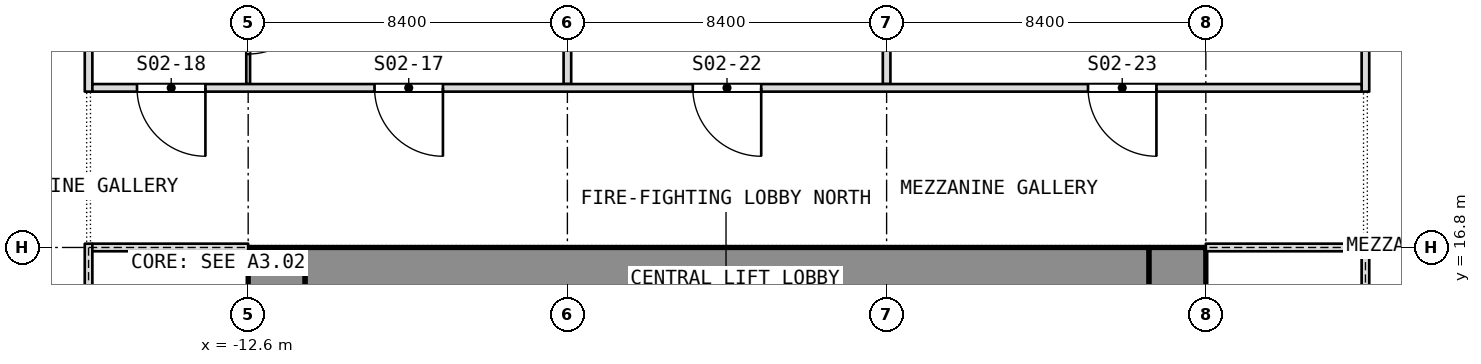
"""IFC4 building model, lengths in metres.
Left out: names, types, materials, properties, quantities, classifications, styles, units other than length and angle.
Written with IfcOpenShell. Run it as: python <this file> out.ifc"""

import sys

from ifc_helpers import new_model, si_unit, direction, frame, frame_2d, origin, place, context, subcontext, project, spatial, rectangle, extrude, element, fill, save


model = new_model("IFC4")
c1 = context("Model", 3, precision=1e-05, world=origin(), true_north=direction((0.0, 1.0)))
c2 = subcontext(c1, "Body", "Model", "MODEL_VIEW")
j1 = project(units=[si_unit("LENGTHUNIT", "METRE"), si_unit("PLANEANGLEUNIT", "RADIAN")], contexts=[c1])
p1 = place(None, origin())
s1 = spatial("IfcSite", under=j1, at=p1, CompositionType="ELEMENT")
p2 = place(p1, origin())
s2 = spatial("IfcBuilding", under=s1, at=p2, CompositionType="ELEMENT")
p3 = place(p2, frame((0.0, 0.0, 8.0)))
s3 = spatial("IfcBuildingStorey", under=s2, at=p3, CompositionType="ELEMENT", Elevation=8.0)
p4 = place(p3, frame((11.85, 0.0, 0.0), z_axis=(0.0, 0.0, 1.0), x_axis=(0.0, 1.0, 0.0)))
e1 = element("IfcWall", 1, at=p4, inside=s3, PredefinedType="SHEAR", context=c2, shape_type="SweptSolid", body=[
    extrude(rectangle(XDim=16.8, YDim=1.5, at=frame_2d((8.4, 0.0))), origin(), (0.0, 0.0, 1.0), 5.0),
])
p5 = place(p4, frame((3.6, 0.0, 0.0)))
e2 = element("IfcOpeningElement", 2, at=p5, cuts=e1, PredefinedType="OPENING", context=c2, shape_type="SweptSolid", body=[
    extrude(rectangle(XDim=0.9, YDim=2.1, at=frame_2d((0.45, 1.05))), frame((0.0, 0.75, 0.0), z_axis=(0.0, -1.0, 0.0), x_axis=(1.0, 0.0, 0.0)), (0.0, 0.0, 1.0), 1.5),
])
p6 = place(p4, frame((6.825, 0.0, 0.0)))
e3 = element("IfcOpeningElement", 3, at=p6, cuts=e1, PredefinedType="OPENING", context=c2, shape_type="SweptSolid", body=[
    extrude(rectangle(XDim=1.2, YDim=2.1, at=frame_2d((0.6, 1.05))), frame((0.0, 0.75, 0.0), z_axis=(0.0, -1.0, 0.0), x_axis=(1.0, 0.0, 0.0)), (0.0, 0.0, 1.0), 1.5),
])
p7 = place(p4, frame((12.3, 0.0, 0.0)))
e4 = element("IfcOpeningElement", 4, at=p7, cuts=e1, PredefinedType="OPENING", context=c2, shape_type="SweptSolid", body=[
    extrude(rectangle(XDim=0.9, YDim=2.1, at=frame_2d((0.45, 1.05))), frame((0.0, 0.75, 0.0), z_axis=(0.0, -1.0, 0.0), x_axis=(1.0, 0.0, 0.0)), (0.0, 0.0, 1.0), 1.5),
])
p8 = place(p4, frame((8.775, 0.0, 0.0)))
e5 = element("IfcOpeningElement", 5, at=p8, cuts=e1, PredefinedType="OPENING", context=c2, shape_type="SweptSolid", body=[
    extrude(rectangle(XDim=1.2, YDim=2.1, at=frame_2d((0.6, 1.05))), frame((0.0, 0.75, 0.0), z_axis=(0.0, -1.0, 0.0), x_axis=(1.0, 0.0, 0.0)), (0.0, 0.0, 1.0), 1.5),
])
p9 = place(p3, frame((-11.85, 0.0, 0.0), z_axis=(0.0, 0.0, 1.0), x_axis=(0.0, 1.0, 0.0)))
e6 = element("IfcWall", 6, at=p9, inside=s3, PredefinedType="SHEAR", context=c2, shape_type="SweptSolid", body=[
    extrude(rectangle(XDim=16.8, YDim=1.5, at=frame_2d((8.4, 0.0))), origin(), (0.0, 0.0, 1.0), 5.0),
])
p10 = place(p9, frame((2.3, 0.0, 0.0)))
e7 = element("IfcOpeningElement", 7, at=p10, cuts=e6, PredefinedType="OPENING", context=c2, shape_type="SweptSolid", body=[
    extrude(rectangle(XDim=1.1, YDim=2.1, at=frame_2d((0.55, 1.05))), frame((0.0, 0.75, 0.0), z_axis=(0.0, -1.0, 0.0), x_axis=(1.0, 0.0, 0.0)), (0.0, 0.0, 1.0), 1.5),
])
p11 = place(p9, frame((4.85, 0.0, 0.0)))
e8 = element("IfcOpeningElement", 8, at=p11, cuts=e6, PredefinedType="OPENING", context=c2, shape_type="SweptSolid", body=[
    extrude(rectangle(XDim=1.1, YDim=2.1, at=frame_2d((0.55, 1.05))), frame((0.0, 0.75, 0.0), z_axis=(0.0, -1.0, 0.0), x_axis=(1.0, 0.0, 0.0)), (0.0, 0.0, 1.0), 1.5),
])
p12 = place(p9, frame((6.825, 0.0, 0.0)))
e9 = element("IfcOpeningElement", 9, at=p12, cuts=e6, PredefinedType="OPENING", context=c2, shape_type="SweptSolid", body=[
    extrude(rectangle(XDim=1.2, YDim=2.1, at=frame_2d((0.6, 1.05))), frame((0.0, 0.75, 0.0), z_axis=(0.0, -1.0, 0.0), x_axis=(1.0, 0.0, 0.0)), (0.0, 0.0, 1.0), 1.5),
])
p13 = place(p9, frame((13.4, 0.0, 0.0)))
e10 = element("IfcOpeningElement", 10, at=p13, cuts=e6, PredefinedType="OPENING", context=c2, shape_type="SweptSolid", body=[
    extrude(rectangle(XDim=1.1, YDim=2.1, at=frame_2d((0.55, 1.05))), frame((0.0, 0.75, 0.0), z_axis=(0.0, -1.0, 0.0), x_axis=(1.0, 0.0, 0.0)), (0.0, 0.0, 1.0), 1.5),
])
p14 = place(p9, frame((10.85, 0.0, 0.0)))
e11 = element("IfcOpeningElement", 11, at=p14, cuts=e6, PredefinedType="OPENING", context=c2, shape_type="SweptSolid", body=[
    extrude(rectangle(XDim=1.1, YDim=2.1, at=frame_2d((0.55, 1.05))), frame((0.0, 0.75, 0.0), z_axis=(0.0, -1.0, 0.0), x_axis=(1.0, 0.0, 0.0)), (0.0, 0.0, 1.0), 1.5),
])
p15 = place(p9, frame((8.775, 0.0, 0.0)))
e12 = element("IfcOpeningElement", 12, at=p15, cuts=e6, PredefinedType="OPENING", context=c2, shape_type="SweptSolid", body=[
    extrude(rectangle(XDim=1.2, YDim=2.1, at=frame_2d((0.6, 1.05))), frame((0.0, 0.75, 0.0), z_axis=(0.0, -1.0, 0.0), x_axis=(1.0, 0.0, 0.0)), (0.0, 0.0, 1.0), 1.5),
])
p16 = place(p3, frame((-11.1, 16.05, 0.0), z_axis=(0.0, 0.0, 1.0), x_axis=(1.0, 0.0, 0.0)))
e13 = element("IfcWall", 13, at=p16, inside=s3, PredefinedType="SHEAR", context=c2, shape_type="SweptSolid", body=[
    extrude(rectangle(XDim=22.2, YDim=1.5, at=frame_2d((11.1, 0.0))), origin(), (0.0, 0.0, 1.0), 5.0),
])
p17 = place(p3, frame((16.8, 20.9, 0.0), z_axis=(0.0, 0.0, 1.0), x_axis=(0.0, 1.0, 0.0)))
e14 = element("IfcWall", 14, at=p17, inside=s3, PredefinedType="PARTITIONING", context=c2, shape_type="SweptSolid", body=[
    extrude(rectangle(XDim=15.0, YDim=0.2, at=frame_2d((7.5, 0.0))), origin(), (0.0, 0.0, 1.0), 4.68),
])
for number, where, z_axis, x_axis in (
    (15, (4.2, 21.1, 0.0), (0.0, 0.0, 1.0), (0.0, 1.0, 0.0)),
    (16, (-4.2, 21.1, 0.0), (0.0, 0.0, 1.0), (0.0, 1.0, 0.0)),
):
    element("IfcWall", number, at=place(p3, frame(where, z_axis=z_axis, x_axis=x_axis)), inside=s3, PredefinedType="PARTITIONING", context=c2, shape_type="SweptSolid", body=[
        extrude(rectangle(XDim=10.73, YDim=0.2, at=frame_2d((5.365, 0.0))), origin(), (0.0, 0.0, 1.0), 4.68),
    ])
p18 = place(p3, frame((-12.6, 21.1, 0.0), z_axis=(0.0, 0.0, 1.0), x_axis=(0.0, 1.0, 0.0)))
e17 = element("IfcWall", 17, at=p18, inside=s3, PredefinedType="PARTITIONING", context=c2, shape_type="SweptSolid", body=[
    extrude(rectangle(XDim=3.38, YDim=0.1, at=frame_2d((1.69, 0.0))), origin(), (0.0, 0.0, 1.0), 4.68),
])
p19 = place(p18, frame((0.79, 0.0, 0.0)))
e18 = element("IfcOpeningElement", 18, at=p19, cuts=e17, PredefinedType="OPENING", context=c2, shape_type="SweptSolid", body=[
    extrude(rectangle(XDim=1.8, YDim=2.1, at=frame_2d((0.9, 1.05))), frame((0.0, 0.05, 0.0), z_axis=(0.0, -1.0, 0.0), x_axis=(1.0, 0.0, 0.0)), (0.0, 0.0, 1.0), 0.1),
])
p20 = place(p3, frame((-16.8, 20.9, 0.0), z_axis=(0.0, 0.0, 1.0), x_axis=(0.0, 1.0, 0.0)))
e19 = element("IfcWall", 19, at=p20, inside=s3, PredefinedType="PARTITIONING", context=c2, shape_type="SweptSolid", body=[
    extrude(rectangle(XDim=13.8, YDim=0.2, at=frame_2d((6.9, 0.0))), origin(), (0.0, 0.0, 1.0), 4.68),
])
p21 = place(p3, frame((-16.7, 21.0, 0.0), z_axis=(0.0, 0.0, 1.0), x_axis=(1.0, 0.0, 0.0)))
e20 = element("IfcWall", 20, at=p21, inside=s3, PredefinedType="PARTITIONING", context=c2, shape_type="SweptSolid", body=[
    extrude(rectangle(XDim=33.4, YDim=0.2, at=frame_2d((16.7, 0.0))), origin(), (0.0, 0.0, 1.0), 4.68),
])
p22 = place(p21, frame((7.425, 0.0, 0.0)))
e21 = element("IfcOpeningElement", 21, at=p22, cuts=e20, PredefinedType="OPENING", context=c2, shape_type="SweptSolid", body=[
    extrude(rectangle(XDim=1.8, YDim=2.1, at=frame_2d((0.9, 1.05))), frame((0.0, 0.1, 0.0), z_axis=(0.0, -1.0, 0.0), x_axis=(1.0, 0.0, 0.0)), (0.0, 0.0, 1.0), 0.2),
])
p23 = place(p21, frame((1.175, 0.0, 0.0)))
e22 = element("IfcOpeningElement", 22, at=p23, cuts=e20, PredefinedType="OPENING", context=c2, shape_type="SweptSolid", body=[
    extrude(rectangle(XDim=1.8, YDim=2.1, at=frame_2d((0.9, 1.05))), frame((0.0, 0.1, 0.0), z_axis=(0.0, -1.0, 0.0), x_axis=(1.0, 0.0, 0.0)), (0.0, 0.0, 1.0), 0.2),
])
p24 = place(p21, frame((15.8, 0.0, 0.0)))
e23 = element("IfcOpeningElement", 23, at=p24, cuts=e20, PredefinedType="OPENING", context=c2, shape_type="SweptSolid", body=[
    extrude(rectangle(XDim=1.8, YDim=2.1, at=frame_2d((0.9, 1.05))), frame((0.0, 0.1, 0.0), z_axis=(0.0, -1.0, 0.0), x_axis=(1.0, 0.0, 0.0)), (0.0, 0.0, 1.0), 0.2),
])
p25 = place(p21, frame((26.2, 0.0, 0.0)))
e24 = element("IfcOpeningElement", 24, at=p25, cuts=e20, PredefinedType="OPENING", context=c2, shape_type="SweptSolid", body=[
    extrude(rectangle(XDim=1.8, YDim=2.1, at=frame_2d((0.9, 1.05))), frame((0.0, 0.1, 0.0), z_axis=(0.0, -1.0, 0.0), x_axis=(1.0, 0.0, 0.0)), (0.0, 0.0, 1.0), 0.2),
])
p26 = place(p3, frame((-16.8, -0.1, 0.0), z_axis=(0.0, 0.0, 1.0), x_axis=(0.0, 1.0, 0.0)))
e25 = element("IfcWall", 25, at=p26, inside=s3, PredefinedType="PARTITIONING", context=c2, shape_type="SweptSolid", body=[
    extrude(rectangle(XDim=17.0, YDim=0.2, at=frame_2d((8.5, 0.0))), origin(), (0.0, 0.0, 1.0), 4.78),
])
p27 = place(p26, frame((1.9, 0.0, 0.0)))
e26 = element("IfcOpeningElement", 26, at=p27, cuts=e25, PredefinedType="OPENING", context=c2, shape_type="SweptSolid", body=[
    extrude(rectangle(XDim=2.4, YDim=2.1, at=frame_2d((1.2, 1.05))), frame((0.0, 0.1, 0.0), z_axis=(0.0, -1.0, 0.0), x_axis=(1.0, 0.0, 0.0)), (0.0, 0.0, 1.0), 0.2),
])
p28 = place(p26, frame((12.7, 0.0, 0.0)))
e27 = element("IfcOpeningElement", 27, at=p28, cuts=e25, PredefinedType="OPENING", context=c2, shape_type="SweptSolid", body=[
    extrude(rectangle(XDim=2.4, YDim=2.1, at=frame_2d((1.2, 1.05))), frame((0.0, 0.1, 0.0), z_axis=(0.0, -1.0, 0.0), x_axis=(1.0, 0.0, 0.0)), (0.0, 0.0, 1.0), 0.2),
])
p29 = place(p3, frame((-16.7, 16.8, 0.0), z_axis=(0.0, 0.0, 1.0), x_axis=(1.0, 0.0, 0.0)))
e28 = element("IfcWall", 28, at=p29, inside=s3, PredefinedType="PARTITIONING", context=c2, shape_type="SweptSolid", body=[
    extrude(rectangle(XDim=4.1, YDim=0.2, at=frame_2d((2.05, 0.0))), origin(), (0.0, 0.0, 1.0), 4.78),
])
p30 = place(p3, frame((16.8, -0.1, 0.0), z_axis=(0.0, 0.0, 1.0), x_axis=(0.0, 1.0, 0.0)))
e29 = element("IfcWall", 29, at=p30, inside=s3, PredefinedType="PARTITIONING", context=c2, shape_type="SweptSolid", body=[
    extrude(rectangle(XDim=17.0, YDim=0.2, at=frame_2d((8.5, 0.0))), origin(), (0.0, 0.0, 1.0), 4.78),
])
p31 = place(p30, frame((1.9, 0.0, 0.0)))
e30 = element("IfcOpeningElement", 30, at=p31, cuts=e29, PredefinedType="OPENING", context=c2, shape_type="SweptSolid", body=[
    extrude(rectangle(XDim=2.4, YDim=2.1, at=frame_2d((1.2, 1.05))), frame((0.0, 0.1, 0.0), z_axis=(0.0, -1.0, 0.0), x_axis=(1.0, 0.0, 0.0)), (0.0, 0.0, 1.0), 0.2),
])
p32 = place(p30, frame((12.7, 0.0, 0.0)))
e31 = element("IfcOpeningElement", 31, at=p32, cuts=e29, PredefinedType="OPENING", context=c2, shape_type="SweptSolid", body=[
    extrude(rectangle(XDim=2.4, YDim=2.1, at=frame_2d((1.2, 1.05))), frame((0.0, 0.1, 0.0), z_axis=(0.0, -1.0, 0.0), x_axis=(1.0, 0.0, 0.0)), (0.0, 0.0, 1.0), 0.2),
])
p33 = place(p3, frame((12.6, 16.8, 0.0), z_axis=(0.0, 0.0, 1.0), x_axis=(1.0, 0.0, 0.0)))
e32 = element("IfcWall", 32, at=p33, inside=s3, PredefinedType="PARTITIONING", context=c2, shape_type="SweptSolid", body=[
    extrude(rectangle(XDim=4.1, YDim=0.2, at=frame_2d((2.05, 0.0))), origin(), (0.0, 0.0, 1.0), 4.78),
])
p34 = place(p19, origin())
e33 = element("IfcDoor", 33, at=p34, inside=s3, OperationType="DOUBLE_DOOR_SINGLE_SWING", PredefinedType="DOOR", context=c2, shape_type="SweptSolid", body=[
    extrude(rectangle(XDim=1.8, YDim=2.1, at=frame_2d((0.9, 1.05))), frame((0.0, 0.025, 0.0), z_axis=(0.0, -1.0, 0.0), x_axis=(1.0, 0.0, 0.0)), (0.0, 0.0, 1.0), 0.05),
])
fill(e18, e33)
p35 = place(p22, origin())
e34 = element("IfcDoor", 34, at=p35, inside=s3, OperationType="DOUBLE_DOOR_SINGLE_SWING", PredefinedType="DOOR", context=c2, shape_type="SweptSolid", body=[
    extrude(rectangle(XDim=1.8, YDim=2.1, at=frame_2d((0.9, 1.05))), frame((0.0, 0.025, 0.0), z_axis=(0.0, -1.0, 0.0), x_axis=(1.0, 0.0, 0.0)), (0.0, 0.0, 1.0), 0.05),
])
fill(e21, e34)
p36 = place(p23, origin())
e35 = element("IfcDoor", 35, at=p36, inside=s3, OperationType="DOUBLE_DOOR_SINGLE_SWING", PredefinedType="DOOR", context=c2, shape_type="SweptSolid", body=[
    extrude(rectangle(XDim=1.8, YDim=2.1, at=frame_2d((0.9, 1.05))), frame((0.0, 0.025, 0.0), z_axis=(0.0, -1.0, 0.0), x_axis=(1.0, 0.0, 0.0)), (0.0, 0.0, 1.0), 0.05),
])
fill(e22, e35)
p37 = place(p24, origin())
e36 = element("IfcDoor", 36, at=p37, inside=s3, OperationType="DOUBLE_DOOR_SINGLE_SWING", PredefinedType="DOOR", context=c2, shape_type="SweptSolid", body=[
    extrude(rectangle(XDim=1.8, YDim=2.1, at=frame_2d((0.9, 1.05))), frame((0.0, 0.025, 0.0), z_axis=(0.0, -1.0, 0.0), x_axis=(1.0, 0.0, 0.0)), (0.0, 0.0, 1.0), 0.05),
])
fill(e23, e36)
p38 = place(p25, origin())
e37 = element("IfcDoor", 37, at=p38, inside=s3, OperationType="DOUBLE_DOOR_SINGLE_SWING", PredefinedType="DOOR", context=c2, shape_type="SweptSolid", body=[
    extrude(rectangle(XDim=1.8, YDim=2.1, at=frame_2d((0.9, 1.05))), frame((0.0, 0.025, 0.0), z_axis=(0.0, -1.0, 0.0), x_axis=(1.0, 0.0, 0.0)), (0.0, 0.0, 1.0), 0.05),
])
fill(e24, e37)
save(model, sys.argv[1])
